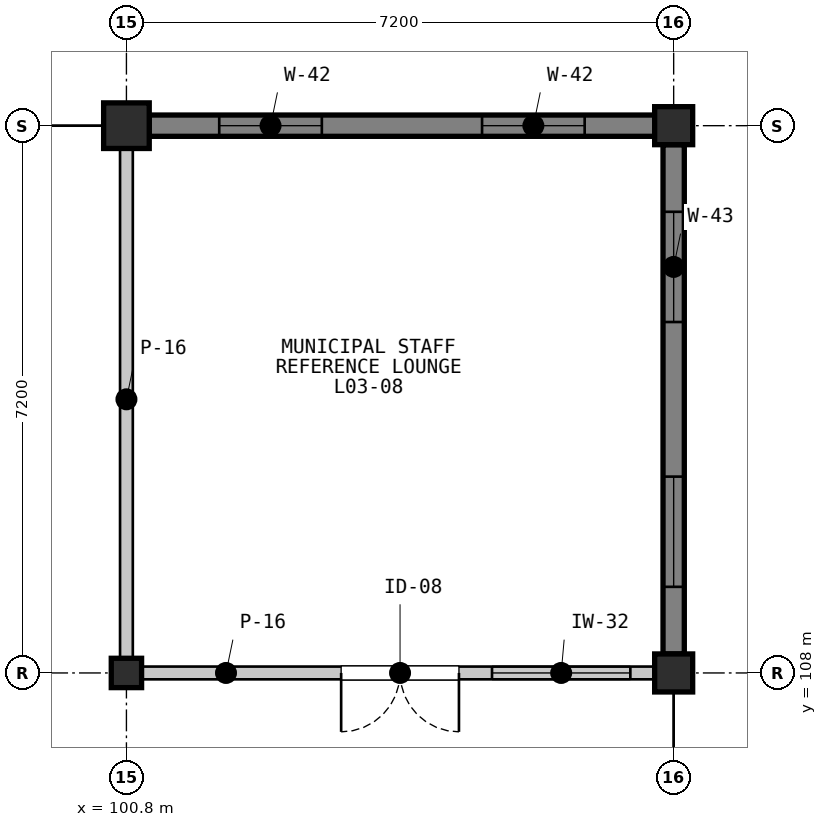
"""IFC4 building model, lengths in metres.
Left out: names, types, materials, properties, quantities, classifications, styles, units other than length and angle.
Written with IfcOpenShell. Run it as: python <this file> out.ifc"""

import sys

from ifc_helpers import new_model, si_unit, direction, frame, frame_2d, origin, origin_2d, place, context, subcontext, project, spatial, rectangle, i_section, extrude, element, fill, save


model = new_model("IFC4")
c1 = context("Model", 3, precision=1e-05, world=origin(), true_north=direction((0.0, 1.0)))
c2 = subcontext(c1, "Body", "Model", "MODEL_VIEW")
j1 = project(units=[si_unit("LENGTHUNIT", "METRE"), si_unit("PLANEANGLEUNIT", "RADIAN")], contexts=[c1])
p1 = place(None, origin())
s1 = spatial("IfcSite", under=j1, at=p1, CompositionType="ELEMENT")
p2 = place(p1, origin())
s2 = spatial("IfcBuilding", under=s1, at=p2, CompositionType="ELEMENT")
p3 = place(p2, frame((0.0, 0.0, 9.9)))
s3 = spatial("IfcBuildingStorey", under=s2, at=p3, CompositionType="ELEMENT", Elevation=9.9)
p4 = place(p3, frame((100.8, 108.0, 0.0), z_axis=(0.0, 0.0, 1.0), x_axis=(1.0, 0.0, 0.0)))
e1 = element("IfcColumn", 1, at=p4, inside=s3, PredefinedType="COLUMN", context=c2, shape_type="SweptSolid", body=[
    extrude(i_section(OverallWidth=0.399, OverallDepth=0.386, WebThickness=0.021, FlangeThickness=0.033, FilletRadius=0.015, at=origin_2d()), origin(), (0.0, 0.0, 1.0), 4.2),
])
p5 = place(p3, frame((100.8, 115.2, 0.0), z_axis=(0.0, 0.0, 1.0), x_axis=(1.0, 0.0, 0.0)))
e2 = element("IfcColumn", 2, at=p5, inside=s3, PredefinedType="COLUMN", context=c2, shape_type="SweptSolid", body=[
    extrude(rectangle(XDim=0.6, YDim=0.6, at=origin_2d()), origin(), (0.0, 0.0, 1.0), 4.2),
])
for number, where, z_axis, x_axis in (
    (3, (108.0, 108.0, 0.0), (0.0, 0.0, 1.0), (1.0, 0.0, 0.0)),
    (4, (108.0, 115.2, 0.0), (0.0, 0.0, 1.0), (1.0, 0.0, 0.0)),
):
    element("IfcColumn", number, at=place(p3, frame(where, z_axis=z_axis, x_axis=x_axis)), inside=s3, PredefinedType="COLUMN", context=c2, shape_type="SweptSolid", body=[
        extrude(rectangle(XDim=0.5, YDim=0.5, at=origin_2d()), origin(), (0.0, 0.0, 1.0), 4.2),
    ])
p6 = place(p3, frame((101.1, 115.2, 0.0), z_axis=(0.0, 0.0, 1.0), x_axis=(1.0, 0.0, 0.0)))
e5 = element("IfcWall", 5, at=p6, inside=s3, PredefinedType="SOLIDWALL", context=c2, shape_type="SweptSolid", body=[
    extrude(rectangle(XDim=6.65, YDim=0.28, at=frame_2d((3.325, 0.0))), origin(), (0.0, 0.0, 1.0), 3.418),
])
p7 = place(p6, frame((0.921, 0.0, 0.95)))
e6 = element("IfcOpeningElement", 6, at=p7, cuts=e5, PredefinedType="OPENING", context=c2, shape_type="SweptSolid", body=[
    extrude(rectangle(XDim=1.35, YDim=1.85, at=frame_2d((0.675, 0.925))), frame((0.0, 0.15, 0.0), z_axis=(0.0, -1.0, 0.0), x_axis=(1.0, 0.0, 0.0)), (0.0, 0.0, 1.0), 0.3),
])
p8 = place(p6, frame((4.379, 0.0, 0.95)))
e7 = element("IfcOpeningElement", 7, at=p8, cuts=e5, PredefinedType="OPENING", context=c2, shape_type="SweptSolid", body=[
    extrude(rectangle(XDim=1.35, YDim=1.85, at=frame_2d((0.675, 0.925))), frame((0.0, 0.15, 0.0), z_axis=(0.0, -1.0, 0.0), x_axis=(1.0, 0.0, 0.0)), (0.0, 0.0, 1.0), 0.3),
])
p9 = place(p3, frame((108.0, 114.95, 0.0), z_axis=(0.0, 0.0, 1.0), x_axis=(0.0, -1.0, 0.0)))
e8 = element("IfcWall", 8, at=p9, inside=s3, PredefinedType="SOLIDWALL", context=c2, shape_type="SweptSolid", body=[
    extrude(rectangle(XDim=6.7, YDim=0.28, at=frame_2d((3.35, 0.0))), origin(), (0.0, 0.0, 1.0), 3.487),
])
p10 = place(p9, frame((0.883, 0.0, 0.95)))
e9 = element("IfcOpeningElement", 9, at=p10, cuts=e8, PredefinedType="OPENING", context=c2, shape_type="SweptSolid", body=[
    extrude(rectangle(XDim=1.45, YDim=1.85, at=frame_2d((0.725, 0.925))), frame((0.0, 0.15, 0.0), z_axis=(0.0, -1.0, 0.0), x_axis=(1.0, 0.0, 0.0)), (0.0, 0.0, 1.0), 0.3),
])
p11 = place(p9, frame((4.367, 0.0, 0.95)))
e10 = element("IfcOpeningElement", 10, at=p11, cuts=e8, PredefinedType="OPENING", context=c2, shape_type="SweptSolid", body=[
    extrude(rectangle(XDim=1.45, YDim=1.85, at=frame_2d((0.725, 0.925))), frame((0.0, 0.15, 0.0), z_axis=(0.0, -1.0, 0.0), x_axis=(1.0, 0.0, 0.0)), (0.0, 0.0, 1.0), 0.3),
])
p12 = place(p3, frame((107.88, 108.0, 0.0), z_axis=(0.0, 0.0, 1.0), x_axis=(-1.0, 0.0, 0.0)))
e11 = element("IfcWall", 11, at=p12, inside=s3, PredefinedType="PARTITIONING", context=c2, shape_type="SweptSolid", body=[
    extrude(rectangle(XDim=6.96, YDim=0.168, at=frame_2d((3.48, 0.0))), origin(), (0.0, 0.0, 1.0), 3.408),
])
p13 = place(p12, frame((2.705, 0.0, 0.0)))
e12 = element("IfcOpeningElement", 12, at=p13, cuts=e11, PredefinedType="OPENING", context=c2, shape_type="SweptSolid", body=[
    extrude(rectangle(XDim=1.55, YDim=2.3, at=frame_2d((0.775, 1.15))), frame((0.0, 0.094, 0.0), z_axis=(0.0, -1.0, 0.0), x_axis=(1.0, 0.0, 0.0)), (0.0, 0.0, 1.0), 0.188),
])
p14 = place(p12, frame((0.45, 0.0, 1.05)))
e13 = element("IfcOpeningElement", 13, at=p14, cuts=e11, PredefinedType="OPENING", context=c2, shape_type="SweptSolid", body=[
    extrude(rectangle(XDim=1.82, YDim=1.02, at=frame_2d((0.91, 0.51))), frame((0.0, 0.094, 0.0), z_axis=(0.0, -1.0, 0.0), x_axis=(1.0, 0.0, 0.0)), (0.0, 0.0, 1.0), 0.188),
])
p15 = place(p3, frame((100.8, 108.12, 0.0), z_axis=(0.0, 0.0, 1.0), x_axis=(0.0, 1.0, 0.0)))
e14 = element("IfcWall", 14, at=p15, inside=s3, PredefinedType="PARTITIONING", context=c2, shape_type="SweptSolid", body=[
    extrude(rectangle(XDim=6.96, YDim=0.168, at=frame_2d((3.48, 0.0))), origin(), (0.0, 0.0, 1.0), 3.408),
])
p16 = place(p7, origin())
e15 = element("IfcWindow", 15, at=p16, inside=s3, PartitioningType="SINGLE_PANEL", PredefinedType="WINDOW", context=c2, shape_type="SweptSolid", body=[
    extrude(rectangle(XDim=1.35, YDim=1.85, at=frame_2d((0.675, 0.925))), frame((0.0, 0.03, 0.0), z_axis=(0.0, -1.0, 0.0), x_axis=(1.0, 0.0, 0.0)), (0.0, 0.0, 1.0), 0.06),
])
fill(e6, e15)
p17 = place(p8, origin())
e16 = element("IfcWindow", 16, at=p17, inside=s3, PartitioningType="SINGLE_PANEL", PredefinedType="WINDOW", context=c2, shape_type="SweptSolid", body=[
    extrude(rectangle(XDim=1.35, YDim=1.85, at=frame_2d((0.675, 0.925))), frame((0.0, 0.03, 0.0), z_axis=(0.0, -1.0, 0.0), x_axis=(1.0, 0.0, 0.0)), (0.0, 0.0, 1.0), 0.06),
])
fill(e7, e16)
p18 = place(p10, origin())
e17 = element("IfcWindow", 17, at=p18, inside=s3, PartitioningType="SINGLE_PANEL", PredefinedType="WINDOW", context=c2, shape_type="SweptSolid", body=[
    extrude(rectangle(XDim=1.45, YDim=1.85, at=frame_2d((0.725, 0.925))), frame((0.0, 0.03, 0.0), z_axis=(0.0, -1.0, 0.0), x_axis=(1.0, 0.0, 0.0)), (0.0, 0.0, 1.0), 0.06),
])
fill(e9, e17)
p19 = place(p11, origin())
e18 = element("IfcWindow", 18, at=p19, inside=s3, PartitioningType="SINGLE_PANEL", PredefinedType="WINDOW", context=c2, shape_type="SweptSolid", body=[
    extrude(rectangle(XDim=1.45, YDim=1.85, at=frame_2d((0.725, 0.925))), frame((0.0, 0.03, 0.0), z_axis=(0.0, -1.0, 0.0), x_axis=(1.0, 0.0, 0.0)), (0.0, 0.0, 1.0), 0.06),
])
fill(e10, e18)
p20 = place(p13, origin())
e19 = element("IfcDoor", 19, at=p20, inside=s3, OperationType="DOUBLE_DOOR_SINGLE_SWING", PredefinedType="DOOR", context=c2, shape_type="SweptSolid", body=[
    extrude(rectangle(XDim=1.55, YDim=2.3, at=frame_2d((0.775, 1.15))), frame((0.0, 0.025, 0.0), z_axis=(0.0, -1.0, 0.0), x_axis=(1.0, 0.0, 0.0)), (0.0, 0.0, 1.0), 0.05),
])
fill(e12, e19)
p21 = place(p14, origin())
e20 = element("IfcWindow", 20, at=p21, inside=s3, PartitioningType="SINGLE_PANEL", PredefinedType="WINDOW", context=c2, shape_type="SweptSolid", body=[
    extrude(rectangle(XDim=1.82, YDim=1.02, at=frame_2d((0.91, 0.51))), frame((0.0, 0.03, 0.0), z_axis=(0.0, -1.0, 0.0), x_axis=(1.0, 0.0, 0.0)), (0.0, 0.0, 1.0), 0.06),
])
fill(e13, e20)
save(model, sys.argv[1])
